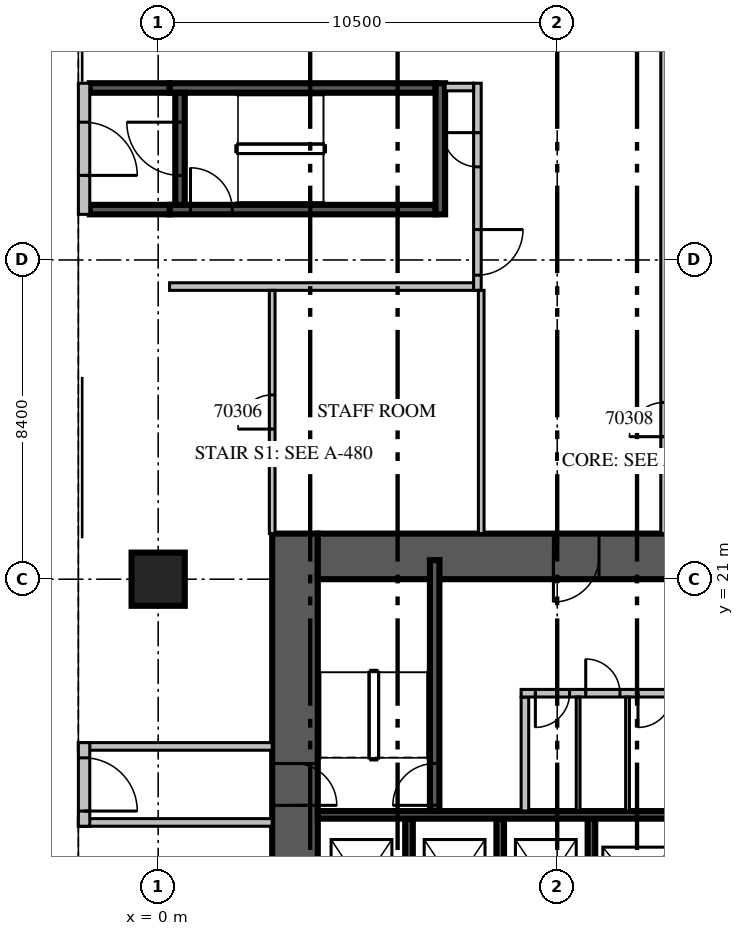
"""IFC4 building model, lengths in metres.
Left out: names, types, materials, properties, quantities, classifications, styles, units other than length and angle.
Written with IfcOpenShell. Run it as: python <this file> out.ifc"""

import sys

from ifc_helpers import new_model, si_unit, direction, frame, frame_2d, origin, origin_2d, place, context, subcontext, project, spatial, rectangle, extrude, source, transform, mapped, element, fill, save


model = new_model("IFC4")
c1 = context("Model", 3, precision=1e-05, world=origin(), true_north=direction((0.0, 1.0)))
c2 = subcontext(c1, "Body", "Model", "MODEL_VIEW")
j1 = project(units=[si_unit("LENGTHUNIT", "METRE"), si_unit("PLANEANGLEUNIT", "RADIAN")], contexts=[c1])
p1 = place(None, origin())
s1 = spatial("IfcSite", under=j1, at=p1, CompositionType="ELEMENT")
p2 = place(p1, origin())
s2 = spatial("IfcBuilding", under=s1, at=p2, CompositionType="ELEMENT")
p3 = place(p2, origin())
s3 = spatial("IfcBuildingStorey", under=s2, at=p3, CompositionType="ELEMENT", Elevation=0.0)
m1 = source(origin(), c2, "Body", "SweptSolid", [
    extrude(rectangle(XDim=1.4, YDim=1.4, at=origin_2d()), origin(), (0.0, 0.0, 1.0), 7.5),
])
p4 = place(p3, frame((0.0, 21.0, 0.0), z_axis=(0.0, 0.0, 1.0), x_axis=(1.0, 0.0, 0.0)))
e1 = element("IfcColumn", 1, at=p4, inside=s3, PredefinedType="COLUMN", context=c2, shape_type="MappedRepresentation", body=[
    mapped(m1, transform((0.0, 0.0, 0.0), scale=1.0)),
])
p5 = place(p3, frame((3.6, 4.2, 0.0), z_axis=(0.0, 0.0, 1.0), x_axis=(0.0, 1.0, 0.0)))
e2 = element("IfcWall", 2, at=p5, inside=s3, PredefinedType="SHEAR", context=c2, shape_type="SweptSolid", body=[
    extrude(rectangle(XDim=18.0, YDim=1.2, at=frame_2d((9.0, 0.0))), origin(), (0.0, 0.0, 1.0), 7.5),
])
m2 = source(origin(), c2, "Body", "SweptSolid", [
    extrude(rectangle(XDim=2.2, YDim=2.1, at=frame_2d((1.1, 1.05))), frame((0.0, 0.61, 0.0), z_axis=(0.0, -1.0, 0.0), x_axis=(1.0, 0.0, 0.0)), (0.0, 0.0, 1.0), 1.22),
])
p6 = place(p5, frame((4.6, 0.0, 0.0)))
e3 = element("IfcOpeningElement", 3, at=p6, cuts=e2, PredefinedType="OPENING", context=c2, shape_type="MappedRepresentation", body=[
    mapped(m2, transform((0.0, 0.0, 0.0), scale=1.0)),
])
p7 = place(p5, frame((10.85, 0.0, 0.0)))
e4 = element("IfcOpeningElement", 4, at=p7, cuts=e2, PredefinedType="OPENING", context=c2, shape_type="SweptSolid", body=[
    extrude(rectangle(XDim=1.1, YDim=2.1, at=frame_2d((0.55, 1.05))), frame((0.0, 0.61, 0.0), z_axis=(0.0, -1.0, 0.0), x_axis=(1.0, 0.0, 0.0)), (0.0, 0.0, 1.0), 1.22),
])
m3 = source(origin(), c2, "Body", "SweptSolid", [
    extrude(rectangle(XDim=16.8, YDim=1.2, at=frame_2d((8.4, 0.0))), origin(), (0.0, 0.0, 1.0), 7.5),
])
p8 = place(p3, frame((4.2, 21.6, 0.0), z_axis=(0.0, 0.0, 1.0), x_axis=(1.0, 0.0, 0.0)))
e5 = element("IfcWall", 5, at=p8, inside=s3, PredefinedType="SHEAR", context=c2, shape_type="MappedRepresentation", body=[
    mapped(m3, transform((0.0, 0.0, 0.0), scale=1.0)),
])
m4 = source(origin(), c2, "Body", "SweptSolid", [
    extrude(rectangle(XDim=1.2, YDim=2.1, at=frame_2d((0.6, 1.05))), frame((0.0, 0.61, 0.0), z_axis=(0.0, -1.0, 0.0), x_axis=(1.0, 0.0, 0.0)), (0.0, 0.0, 1.0), 1.22),
])
p9 = place(p8, frame((6.2, 0.0, 0.0)))
e6 = element("IfcOpeningElement", 6, at=p9, cuts=e5, PredefinedType="OPENING", context=c2, shape_type="MappedRepresentation", body=[
    mapped(m4, transform((0.0, 0.0, 0.0), scale=1.0)),
])
p10 = place(p3, frame((6.6, 11.7, 0.0), z_axis=(0.0, 0.0, 1.0), x_axis=(0.0, 1.0, 0.0)))
e7 = element("IfcWall", 7, at=p10, inside=s3, PredefinedType="SOLIDWALL", context=c2, shape_type="SweptSolid", body=[
    extrude(rectangle(XDim=3.0, YDim=0.2, at=frame_2d((1.5, 0.0))), origin(), (0.0, 0.0, 1.0), 7.5),
])
m5 = source(origin(), c2, "Body", "SweptSolid", [
    extrude(rectangle(XDim=3.0, YDim=0.2, at=frame_2d((1.5, 0.0))), origin(), (0.0, 0.0, 1.0), 7.5),
])
for number, where, z_axis, x_axis in (
    (8, (9.0, 11.7, 0.0), (0.0, 0.0, 1.0), (0.0, 1.0, 0.0)),
    (9, (11.4, 11.7, 0.0), (0.0, 0.0, 1.0), (0.0, 1.0, 0.0)),
):
    element("IfcWall", number, at=place(p3, frame(where, z_axis=z_axis, x_axis=x_axis)), inside=s3, PredefinedType="SOLIDWALL", context=c2, shape_type="MappedRepresentation", body=[
        mapped(m5, transform((0.0, 0.0, 0.0), scale=1.0)),
    ])
m6 = source(origin(), c2, "Body", "SweptSolid", [
    extrude(rectangle(XDim=16.8, YDim=0.2, at=frame_2d((8.4, 0.0))), origin(), (0.0, 0.0, 1.0), 7.5),
])
p11 = place(p3, frame((4.2, 14.8, 0.0), z_axis=(0.0, 0.0, 1.0), x_axis=(1.0, 0.0, 0.0)))
e10 = element("IfcWall", 10, at=p11, inside=s3, PredefinedType="SOLIDWALL", context=c2, shape_type="MappedRepresentation", body=[
    mapped(m6, transform((0.0, 0.0, 0.0), scale=1.0)),
])
m7 = source(origin(), c2, "Body", "SweptSolid", [
    extrude(rectangle(XDim=1.1, YDim=2.1, at=frame_2d((0.55, 1.05))), frame((0.0, 0.11, 0.0), z_axis=(0.0, -1.0, 0.0), x_axis=(1.0, 0.0, 0.0)), (0.0, 0.0, 1.0), 0.22),
])
p12 = place(p11, frame((10.25, 0.0, 0.0)))
e11 = element("IfcOpeningElement", 11, at=p12, cuts=e10, PredefinedType="OPENING", context=c2, shape_type="MappedRepresentation", body=[
    mapped(m7, transform((0.0, 0.0, 0.0), scale=1.0)),
])
p13 = place(p11, frame((12.65, 0.0, 0.0)))
e12 = element("IfcOpeningElement", 12, at=p13, cuts=e10, PredefinedType="OPENING", context=c2, shape_type="MappedRepresentation", body=[
    mapped(m7, transform((0.0, 0.0, 0.0), scale=1.0)),
])
p14 = place(p11, frame((15.05, 0.0, 0.0)))
e13 = element("IfcOpeningElement", 13, at=p14, cuts=e10, PredefinedType="OPENING", context=c2, shape_type="MappedRepresentation", body=[
    mapped(m7, transform((0.0, 0.0, 0.0), scale=1.0)),
])
p15 = place(p3, frame((7.275, 14.9, 0.0), z_axis=(0.0, 0.0, 1.0), x_axis=(0.0, 1.0, 0.0)))
e14 = element("IfcWall", 14, at=p15, inside=s3, PredefinedType="SOLIDWALL", context=c2, shape_type="SweptSolid", body=[
    extrude(rectangle(XDim=6.6, YDim=0.25, at=frame_2d((3.3, 0.0))), origin(), (0.0, 0.0, 1.0), 6.9),
])
m8 = source(origin(), c2, "Body", "SweptSolid", [
    extrude(rectangle(XDim=1.1, YDim=2.1, at=frame_2d((0.55, 1.05))), frame((0.0, 0.135, 0.0), z_axis=(0.0, -1.0, 0.0), x_axis=(1.0, 0.0, 0.0)), (0.0, 0.0, 1.0), 0.27),
])
p16 = place(p15, frame((0.15, 0.0, 0.0)))
e15 = element("IfcOpeningElement", 15, at=p16, cuts=e14, PredefinedType="OPENING", context=c2, shape_type="MappedRepresentation", body=[
    mapped(m8, transform((0.0, 0.0, 0.0), scale=1.0)),
])
p17 = place(p3, frame((9.65, 14.9, 0.0), z_axis=(0.0, 0.0, 1.0), x_axis=(0.0, 1.0, 0.0)))
e16 = element("IfcWall", 16, at=p17, inside=s3, PredefinedType="PARTITIONING", context=c2, shape_type="SweptSolid", body=[
    extrude(rectangle(XDim=3.0, YDim=0.2, at=frame_2d((1.5, 0.0))), origin(), (0.0, 0.0, 1.0), 6.9),
])
p18 = place(p3, frame((9.55, 18.0, 0.0), z_axis=(0.0, 0.0, 1.0), x_axis=(1.0, 0.0, 0.0)))
e17 = element("IfcWall", 17, at=p18, inside=s3, PredefinedType="PARTITIONING", context=c2, shape_type="SweptSolid", body=[
    extrude(rectangle(XDim=11.45, YDim=0.2, at=frame_2d((5.725, 0.0))), origin(), (0.0, 0.0, 1.0), 6.9),
])
m9 = source(origin(), c2, "Body", "SweptSolid", [
    extrude(rectangle(XDim=0.9, YDim=2.1, at=frame_2d((0.45, 1.05))), frame((0.0, 0.11, 0.0), z_axis=(0.0, -1.0, 0.0), x_axis=(1.0, 0.0, 0.0)), (0.0, 0.0, 1.0), 0.22),
])
p19 = place(p18, frame((0.375, 0.0, 0.0)))
e18 = element("IfcOpeningElement", 18, at=p19, cuts=e17, PredefinedType="OPENING", context=c2, shape_type="MappedRepresentation", body=[
    mapped(m9, transform((0.0, 0.0, 0.0), scale=1.0)),
])
p20 = place(p18, frame((1.7, 0.0, 0.0)))
e19 = element("IfcOpeningElement", 19, at=p20, cuts=e17, PredefinedType="OPENING", context=c2, shape_type="MappedRepresentation", body=[
    mapped(m9, transform((0.0, 0.0, 0.0), scale=1.0)),
])
p21 = place(p18, frame((3.075, 0.0, 0.0)))
e20 = element("IfcOpeningElement", 20, at=p21, cuts=e17, PredefinedType="OPENING", context=c2, shape_type="MappedRepresentation", body=[
    mapped(m9, transform((0.0, 0.0, 0.0), scale=1.0)),
])
p22 = place(p18, frame((7.35, 0.0, 0.0)))
e21 = element("IfcOpeningElement", 21, at=p22, cuts=e17, PredefinedType="OPENING", context=c2, shape_type="MappedRepresentation", body=[
    mapped(m7, transform((0.0, 0.0, 0.0), scale=1.0)),
])
p23 = place(p3, frame((11.05, 14.9, 0.0), z_axis=(0.0, 0.0, 1.0), x_axis=(0.0, 1.0, 0.0)))
e22 = element("IfcWall", 22, at=p23, inside=s3, PredefinedType="PARTITIONING", context=c2, shape_type="SweptSolid", body=[
    extrude(rectangle(XDim=3.0, YDim=0.1, at=frame_2d((1.5, 0.0))), origin(), (0.0, 0.0, 1.0), 6.9),
])
m10 = source(origin(), c2, "Body", "SweptSolid", [
    extrude(rectangle(XDim=3.0, YDim=0.1, at=frame_2d((1.5, 0.0))), origin(), (0.0, 0.0, 1.0), 6.9),
])
p24 = place(p3, frame((12.35, 14.9, 0.0), z_axis=(0.0, 0.0, 1.0), x_axis=(0.0, 1.0, 0.0)))
e23 = element("IfcWall", 23, at=p24, inside=s3, PredefinedType="PARTITIONING", context=c2, shape_type="MappedRepresentation", body=[
    mapped(m10, transform((0.0, 0.0, 0.0), scale=1.0)),
])
p25 = place(p3, frame((-2.1, 14.6, 0.0), z_axis=(0.0, 0.0, 1.0), x_axis=(1.0, 0.0, 0.0)))
e24 = element("IfcWall", 24, at=p25, inside=s3, PredefinedType="PARTITIONING", context=c2, shape_type="SweptSolid", body=[
    extrude(rectangle(XDim=5.1, YDim=0.2, at=frame_2d((2.55, 0.0))), origin(), (0.0, 0.0, 1.0), 6.9),
])
m11 = source(origin(), c2, "Body", "SweptSolid", [
    extrude(rectangle(XDim=5.1, YDim=0.2, at=frame_2d((2.55, 0.0))), origin(), (0.0, 0.0, 1.0), 6.9),
])
p26 = place(p3, frame((-2.1, 16.6, 0.0), z_axis=(0.0, 0.0, 1.0), x_axis=(1.0, 0.0, 0.0)))
e25 = element("IfcWall", 25, at=p26, inside=s3, PredefinedType="PARTITIONING", context=c2, shape_type="MappedRepresentation", body=[
    mapped(m11, transform((0.0, 0.0, 0.0), scale=1.0)),
])
p27 = place(p3, frame((-1.95, 14.5, 0.0), z_axis=(0.0, 0.0, 1.0), x_axis=(0.0, 1.0, 0.0)))
e26 = element("IfcWall", 26, at=p27, inside=s3, PredefinedType="PARTITIONING", context=c2, shape_type="SweptSolid", body=[
    extrude(rectangle(XDim=2.2, YDim=0.3, at=frame_2d((1.1, 0.0))), origin(), (0.0, 0.0, 1.0), 6.9),
])
m12 = source(origin(), c2, "Body", "SweptSolid", [
    extrude(rectangle(XDim=1.4, YDim=2.1, at=frame_2d((0.7, 1.05))), frame((0.0, 0.16, 0.0), z_axis=(0.0, -1.0, 0.0), x_axis=(1.0, 0.0, 0.0)), (0.0, 0.0, 1.0), 0.32),
])
p28 = place(p27, frame((0.4, 0.0, 0.0)))
e27 = element("IfcOpeningElement", 27, at=p28, cuts=e26, PredefinedType="OPENING", context=c2, shape_type="MappedRepresentation", body=[
    mapped(m12, transform((0.0, 0.0, 0.0), scale=1.0)),
])
m13 = source(origin(), c2, "Body", "SweptSolid", [
    extrude(rectangle(XDim=7.0, YDim=0.25, at=frame_2d((3.5, 0.0))), origin(), (0.0, 0.0, 1.0), 6.9),
])
p29 = place(p3, frame((0.3, 30.725, 0.0), z_axis=(0.0, 0.0, 1.0), x_axis=(1.0, 0.0, 0.0)))
e28 = element("IfcWall", 28, at=p29, inside=s3, PredefinedType="SOLIDWALL", context=c2, shape_type="MappedRepresentation", body=[
    mapped(m13, transform((0.0, 0.0, 0.0), scale=1.0)),
])
p30 = place(p29, frame((0.55, 0.0, 0.0)))
e29 = element("IfcOpeningElement", 29, at=p30, cuts=e28, PredefinedType="OPENING", context=c2, shape_type="MappedRepresentation", body=[
    mapped(m8, transform((0.0, 0.0, 0.0), scale=1.0)),
])
p31 = place(p3, frame((0.3, 33.925, 0.0), z_axis=(0.0, 0.0, 1.0), x_axis=(1.0, 0.0, 0.0)))
e30 = element("IfcWall", 30, at=p31, inside=s3, PredefinedType="SOLIDWALL", context=c2, shape_type="MappedRepresentation", body=[
    mapped(m13, transform((0.0, 0.0, 0.0), scale=1.0)),
])
m14 = source(origin(), c2, "Body", "SweptSolid", [
    extrude(rectangle(XDim=3.45, YDim=0.25, at=frame_2d((1.725, 0.0))), origin(), (0.0, 0.0, 1.0), 6.9),
])
p32 = place(p3, frame((7.425, 30.6, 0.0), z_axis=(0.0, 0.0, 1.0), x_axis=(0.0, 1.0, 0.0)))
e31 = element("IfcWall", 31, at=p32, inside=s3, PredefinedType="SOLIDWALL", context=c2, shape_type="MappedRepresentation", body=[
    mapped(m14, transform((0.0, 0.0, 0.0), scale=1.0)),
])
m15 = source(origin(), c2, "Body", "SweptSolid", [
    extrude(rectangle(XDim=2.95, YDim=0.25, at=frame_2d((1.475, 0.0))), origin(), (0.0, 0.0, 1.0), 6.9),
])
p33 = place(p3, frame((0.575, 33.8, 0.0), z_axis=(0.0, 0.0, 1.0), x_axis=(0.0, -1.0, 0.0)))
e32 = element("IfcWall", 32, at=p33, inside=s3, PredefinedType="SOLIDWALL", context=c2, shape_type="MappedRepresentation", body=[
    mapped(m15, transform((0.0, 0.0, 0.0), scale=1.0)),
])
m16 = source(origin(), c2, "Body", "SweptSolid", [
    extrude(rectangle(XDim=1.4, YDim=2.1, at=frame_2d((0.7, 1.05))), frame((0.0, 0.135, 0.0), z_axis=(0.0, -1.0, 0.0), x_axis=(1.0, 0.0, 0.0)), (0.0, 0.0, 1.0), 0.27),
])
p34 = place(p33, frame((0.775, 0.0, 0.0)))
e33 = element("IfcOpeningElement", 33, at=p34, cuts=e32, PredefinedType="OPENING", context=c2, shape_type="MappedRepresentation", body=[
    mapped(m16, transform((0.0, 0.0, 0.0), scale=1.0)),
])
m17 = source(origin(), c2, "Body", "SweptSolid", [
    extrude(rectangle(XDim=8.0, YDim=0.2, at=frame_2d((4.0, 0.0))), origin(), (0.0, 0.0, 1.0), 6.9),
])
p35 = place(p3, frame((0.3, 28.7, 0.0), z_axis=(0.0, 0.0, 1.0), x_axis=(1.0, 0.0, 0.0)))
e34 = element("IfcWall", 34, at=p35, inside=s3, PredefinedType="PARTITIONING", context=c2, shape_type="MappedRepresentation", body=[
    mapped(m17, transform((0.0, 0.0, 0.0), scale=1.0)),
])
m18 = source(origin(), c2, "Body", "SweptSolid", [
    extrude(rectangle(XDim=5.45, YDim=0.2, at=frame_2d((2.725, 0.0))), origin(), (0.0, 0.0, 1.0), 6.9),
])
p36 = place(p3, frame((8.4, 34.05, 0.0), z_axis=(0.0, 0.0, 1.0), x_axis=(0.0, -1.0, 0.0)))
e35 = element("IfcWall", 35, at=p36, inside=s3, PredefinedType="PARTITIONING", context=c2, shape_type="MappedRepresentation", body=[
    mapped(m18, transform((0.0, 0.0, 0.0), scale=1.0)),
])
m19 = source(origin(), c2, "Body", "SweptSolid", [
    extrude(rectangle(XDim=1.2, YDim=2.1, at=frame_2d((0.6, 1.05))), frame((0.0, 0.11, 0.0), z_axis=(0.0, -1.0, 0.0), x_axis=(1.0, 0.0, 0.0)), (0.0, 0.0, 1.0), 0.22),
])
p37 = place(p36, frame((3.85, 0.0, 0.0)))
e36 = element("IfcOpeningElement", 36, at=p37, cuts=e35, PredefinedType="OPENING", context=c2, shape_type="MappedRepresentation", body=[
    mapped(m19, transform((0.0, 0.0, 0.0), scale=1.0)),
])
p38 = place(p36, frame((1.3, 0.0, 0.0)))
e37 = element("IfcOpeningElement", 37, at=p38, cuts=e35, PredefinedType="OPENING", context=c2, shape_type="MappedRepresentation", body=[
    mapped(m9, transform((0.0, 0.0, 0.0), scale=1.0)),
])
m20 = source(origin(), c2, "Body", "SweptSolid", [
    extrude(rectangle(XDim=0.75, YDim=0.2, at=frame_2d((0.375, 0.0))), origin(), (0.0, 0.0, 1.0), 6.9),
])
p39 = place(p3, frame((7.55, 33.95, 0.0), z_axis=(0.0, 0.0, 1.0), x_axis=(1.0, 0.0, 0.0)))
e38 = element("IfcWall", 38, at=p39, inside=s3, PredefinedType="PARTITIONING", context=c2, shape_type="MappedRepresentation", body=[
    mapped(m20, transform((0.0, 0.0, 0.0), scale=1.0)),
])
m21 = source(origin(), c2, "Body", "SweptSolid", [
    extrude(rectangle(XDim=2.1, YDim=0.25, at=frame_2d((1.05, 0.0))), origin(), (0.0, 0.0, 1.0), 6.9),
])
for number, where, z_axis, x_axis in (
    (39, (-1.8, 30.725, 0.0), (0.0, 0.0, 1.0), (1.0, 0.0, 0.0)),
    (40, (-1.8, 33.925, 0.0), (0.0, 0.0, 1.0), (1.0, 0.0, 0.0)),
):
    element("IfcWall", number, at=place(p3, frame(where, z_axis=z_axis, x_axis=x_axis)), inside=s3, PredefinedType="SOLIDWALL", context=c2, shape_type="MappedRepresentation", body=[
        mapped(m21, transform((0.0, 0.0, 0.0), scale=1.0)),
    ])
m22 = source(origin(), c2, "Body", "SweptSolid", [
    extrude(rectangle(XDim=3.45, YDim=0.3, at=frame_2d((1.725, 0.0))), origin(), (0.0, 0.0, 1.0), 6.9),
])
p40 = place(p3, frame((-1.95, 30.6, 0.0), z_axis=(0.0, 0.0, 1.0), x_axis=(0.0, 1.0, 0.0)))
e41 = element("IfcWall", 41, at=p40, inside=s3, PredefinedType="PARTITIONING", context=c2, shape_type="MappedRepresentation", body=[
    mapped(m22, transform((0.0, 0.0, 0.0), scale=1.0)),
])
p41 = place(p40, frame((1.025, 0.0, 0.0)))
e42 = element("IfcOpeningElement", 42, at=p41, cuts=e41, PredefinedType="OPENING", context=c2, shape_type="MappedRepresentation", body=[
    mapped(m12, transform((0.0, 0.0, 0.0), scale=1.0)),
])
p42 = place(p3, frame((3.0, 22.2, 0.0), z_axis=(0.0, 0.0, 1.0), x_axis=(0.0, 1.0, 0.0)))
e43 = element("IfcWall", 43, at=p42, inside=s3, PredefinedType="PARTITIONING", context=c2, shape_type="SweptSolid", body=[
    extrude(rectangle(XDim=6.4, YDim=0.15, at=frame_2d((3.2, 0.0))), origin(), (0.0, 0.0, 1.0), 6.9),
])
m23 = source(origin(), c2, "Body", "SweptSolid", [
    extrude(rectangle(XDim=0.9, YDim=2.1, at=frame_2d((0.45, 1.05))), frame((0.0, 0.085, 0.0), z_axis=(0.0, -1.0, 0.0), x_axis=(1.0, 0.0, 0.0)), (0.0, 0.0, 1.0), 0.17),
])
p43 = place(p42, frame((2.75, 0.0, 0.0)))
e44 = element("IfcOpeningElement", 44, at=p43, cuts=e43, PredefinedType="OPENING", context=c2, shape_type="MappedRepresentation", body=[
    mapped(m23, transform((0.0, 0.0, 0.0), scale=1.0)),
])
m24 = source(origin(), c2, "Body", "SweptSolid", [
    extrude(rectangle(XDim=6.4, YDim=0.15, at=frame_2d((3.2, 0.0))), origin(), (0.0, 0.0, 1.0), 6.9),
])
p44 = place(p3, frame((8.5, 22.2, 0.0), z_axis=(0.0, 0.0, 1.0), x_axis=(0.0, 1.0, 0.0)))
e45 = element("IfcWall", 45, at=p44, inside=s3, PredefinedType="PARTITIONING", context=c2, shape_type="MappedRepresentation", body=[
    mapped(m24, transform((0.0, 0.0, 0.0), scale=1.0)),
])
p45 = place(p3, frame((13.3, 22.2, 0.0), z_axis=(0.0, 0.0, 1.0), x_axis=(0.0, 1.0, 0.0)))
e46 = element("IfcWall", 46, at=p45, inside=s3, PredefinedType="PARTITIONING", context=c2, shape_type="SweptSolid", body=[
    extrude(rectangle(XDim=20.3, YDim=0.15, at=frame_2d((10.15, 0.0))), origin(), (0.0, 0.0, 1.0), 6.9),
])
p46 = place(p45, frame((2.55, 0.0, 0.0)))
e47 = element("IfcOpeningElement", 47, at=p46, cuts=e46, PredefinedType="OPENING", context=c2, shape_type="MappedRepresentation", body=[
    mapped(m23, transform((0.0, 0.0, 0.0), scale=1.0)),
])
m25 = source(origin(), c2, "Body", "SweptSolid", [
    extrude(rectangle(XDim=1.1, YDim=2.1, at=frame_2d((0.55, 1.05))), frame((0.0, 0.025, 0.0), z_axis=(0.0, -1.0, 0.0), x_axis=(1.0, 0.0, 0.0)), (0.0, 0.0, 1.0), 0.05),
])
p47 = place(p16, origin())
e48 = element("IfcDoor", 48, at=p47, inside=s3, OperationType="SINGLE_SWING_LEFT", PredefinedType="DOOR", context=c2, shape_type="MappedRepresentation", body=[
    mapped(m25, transform((0.0, 0.0, 0.0), scale=1.0)),
])
fill(e15, e48)
m26 = source(origin(), c2, "Body", "SweptSolid", [
    extrude(rectangle(XDim=0.9, YDim=2.1, at=frame_2d((0.45, 1.05))), frame((0.0, 0.025, 0.0), z_axis=(0.0, -1.0, 0.0), x_axis=(1.0, 0.0, 0.0)), (0.0, 0.0, 1.0), 0.05),
])
p48 = place(p19, origin())
e49 = element("IfcDoor", 49, at=p48, inside=s3, OperationType="SINGLE_SWING_RIGHT", PredefinedType="DOOR", context=c2, shape_type="MappedRepresentation", body=[
    mapped(m26, transform((0.0, 0.0, 0.0), scale=1.0)),
])
fill(e18, e49)
p49 = place(p20, origin())
e50 = element("IfcDoor", 50, at=p49, inside=s3, OperationType="SINGLE_SWING_LEFT", PredefinedType="DOOR", context=c2, shape_type="MappedRepresentation", body=[
    mapped(m26, transform((0.0, 0.0, 0.0), scale=1.0)),
])
fill(e19, e50)
p50 = place(p21, origin())
e51 = element("IfcDoor", 51, at=p50, inside=s3, OperationType="SINGLE_SWING_RIGHT", PredefinedType="DOOR", context=c2, shape_type="MappedRepresentation", body=[
    mapped(m26, transform((0.0, 0.0, 0.0), scale=1.0)),
])
fill(e20, e51)
m27 = source(origin(), c2, "Body", "SweptSolid", [
    extrude(rectangle(XDim=1.4, YDim=2.1, at=frame_2d((0.7, 1.05))), frame((0.0, 0.025, 0.0), z_axis=(0.0, -1.0, 0.0), x_axis=(1.0, 0.0, 0.0)), (0.0, 0.0, 1.0), 0.05),
])
p51 = place(p28, origin())
e52 = element("IfcDoor", 52, at=p51, inside=s3, OperationType="DOUBLE_DOOR_SINGLE_SWING", PredefinedType="DOOR", context=c2, shape_type="MappedRepresentation", body=[
    mapped(m27, transform((0.0, 0.0, 0.0), scale=1.0)),
])
fill(e27, e52)
p52 = place(p30, origin())
e53 = element("IfcDoor", 53, at=p52, inside=s3, OperationType="SINGLE_SWING_LEFT", PredefinedType="DOOR", context=c2, shape_type="MappedRepresentation", body=[
    mapped(m25, transform((0.0, 0.0, 0.0), scale=1.0)),
])
fill(e29, e53)
p53 = place(p34, origin())
e54 = element("IfcDoor", 54, at=p53, inside=s3, OperationType="DOUBLE_DOOR_SINGLE_SWING", PredefinedType="DOOR", context=c2, shape_type="MappedRepresentation", body=[
    mapped(m27, transform((0.0, 0.0, 0.0), scale=1.0)),
])
fill(e33, e54)
m28 = source(origin(), c2, "Body", "SweptSolid", [
    extrude(rectangle(XDim=1.2, YDim=2.1, at=frame_2d((0.6, 1.05))), frame((0.0, 0.025, 0.0), z_axis=(0.0, -1.0, 0.0), x_axis=(1.0, 0.0, 0.0)), (0.0, 0.0, 1.0), 0.05),
])
p54 = place(p37, origin())
e55 = element("IfcDoor", 55, at=p54, inside=s3, OperationType="SINGLE_SWING_LEFT", PredefinedType="DOOR", context=c2, shape_type="MappedRepresentation", body=[
    mapped(m28, transform((0.0, 0.0, 0.0), scale=1.0)),
])
fill(e36, e55)
p55 = place(p38, origin())
e56 = element("IfcDoor", 56, at=p55, inside=s3, OperationType="SINGLE_SWING_RIGHT", PredefinedType="DOOR", context=c2, shape_type="MappedRepresentation", body=[
    mapped(m26, transform((0.0, 0.0, 0.0), scale=1.0)),
])
fill(e37, e56)
p56 = place(p41, origin())
e57 = element("IfcDoor", 57, at=p56, inside=s3, OperationType="DOUBLE_DOOR_SINGLE_SWING", PredefinedType="DOOR", context=c2, shape_type="MappedRepresentation", body=[
    mapped(m27, transform((0.0, 0.0, 0.0), scale=1.0)),
])
fill(e42, e57)
p57 = place(p9, origin())
e58 = element("IfcDoor", 58, at=p57, inside=s3, OperationType="SINGLE_SWING_RIGHT", PredefinedType="DOOR", context=c2, shape_type="MappedRepresentation", body=[
    mapped(m28, transform((0.0, 0.0, 0.0), scale=1.0)),
])
fill(e6, e58)
p58 = place(p7, origin())
e59 = element("IfcDoor", 59, at=p58, inside=s3, OperationType="SINGLE_SWING_RIGHT", PredefinedType="DOOR", context=c2, shape_type="MappedRepresentation", body=[
    mapped(m25, transform((0.0, 0.0, 0.0), scale=1.0)),
])
fill(e4, e59)
p59 = place(p43, origin())
e60 = element("IfcDoor", 60, at=p59, inside=s3, OperationType="SINGLE_SWING_LEFT", PredefinedType="DOOR", context=c2, shape_type="MappedRepresentation", body=[
    mapped(m26, transform((0.0, 0.0, 0.0), scale=1.0)),
])
fill(e44, e60)
p60 = place(p46, origin())
e61 = element("IfcDoor", 61, at=p60, inside=s3, OperationType="SINGLE_SWING_LEFT", PredefinedType="DOOR", context=c2, shape_type="MappedRepresentation", body=[
    mapped(m26, transform((0.0, 0.0, 0.0), scale=1.0)),
])
fill(e47, e61)
save(model, sys.argv[1])
